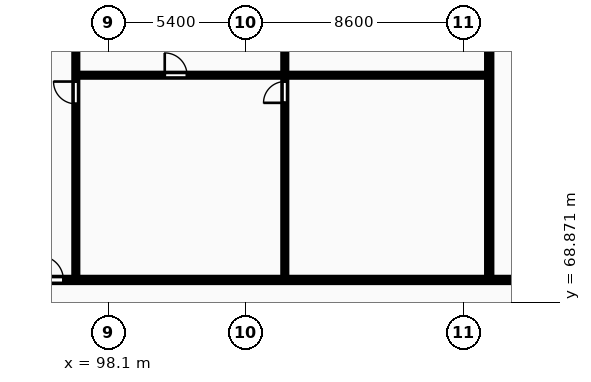
"""IFC4 building model, lengths in metres.
Left out: names, types, materials, properties, quantities, classifications, styles, units other than length and angle.
Written with IfcOpenShell. Run it as: python <this file> out.ifc"""

import sys

from ifc_helpers import new_model, si_unit, direction, frame, frame_2d, origin, place, context, subcontext, project, spatial, rectangle, extrude, element, fill, save


model = new_model("IFC4")
c1 = context("Model", 3, precision=1e-05, world=origin(), true_north=direction((0.0, 1.0)))
c2 = subcontext(c1, "Body", "Model", "MODEL_VIEW")
j1 = project(units=[si_unit("LENGTHUNIT", "METRE"), si_unit("PLANEANGLEUNIT", "RADIAN")], contexts=[c1])
p1 = place(None, origin())
s1 = spatial("IfcSite", under=j1, at=p1, CompositionType="ELEMENT")
p2 = place(p1, origin())
s2 = spatial("IfcBuilding", under=s1, at=p2, CompositionType="ELEMENT")
p3 = place(p2, frame((0.0, 0.0, 126.3)))
s3 = spatial("IfcBuildingStorey", under=s2, at=p3, CompositionType="ELEMENT", Elevation=126.3)
p4 = place(p3, frame((113.125, 69.83, 0.0), z_axis=(0.0, 0.0, 1.0), x_axis=(0.0, 1.0, 0.0)))
e1 = element("IfcWall", 1, at=p4, inside=s3, PredefinedType="PARTITIONING", context=c2, shape_type="SweptSolid", body=[
    extrude(rectangle(XDim=26.07, YDim=0.2, at=frame_2d((13.035, 0.0))), origin(), (0.0, 0.0, 1.0), 2.97),
])
p5 = place(p3, frame((105.056, 69.81, 0.0), z_axis=(0.0, 0.0, 1.0), x_axis=(0.0, 1.0, 0.0)))
e2 = element("IfcWall", 2, at=p5, inside=s3, PredefinedType="PARTITIONING", context=c2, shape_type="SweptSolid", body=[
    extrude(rectangle(XDim=16.4, YDim=0.15, at=frame_2d((8.2, 0.0))), origin(), (0.0, 0.0, 1.0), 2.97),
])
p6 = place(p5, frame((6.93, 0.0, 0.0)))
e3 = element("IfcOpeningElement", 3, at=p6, cuts=e2, PredefinedType="OPENING", context=c2, shape_type="SweptSolid", body=[
    extrude(rectangle(XDim=0.84, YDim=2.04, at=frame_2d((0.42, 1.02))), frame((0.0, 0.085, 0.0), z_axis=(0.0, -1.0, 0.0), x_axis=(1.0, 0.0, 0.0)), (0.0, 0.0, 1.0), 0.17),
])
p7 = place(p5, frame((11.582, 0.0, 0.0)))
e4 = element("IfcOpeningElement", 4, at=p7, cuts=e2, PredefinedType="OPENING", context=c2, shape_type="SweptSolid", body=[
    extrude(rectangle(XDim=0.88, YDim=2.06, at=frame_2d((0.44, 1.03))), frame((0.0, 0.085, 0.0), z_axis=(0.0, -1.0, 0.0), x_axis=(1.0, 0.0, 0.0)), (0.0, 0.0, 1.0), 0.17),
])
p8 = place(p3, frame((96.867, 77.83, 0.0), z_axis=(0.0, 0.0, 1.0), x_axis=(1.0, 0.0, 0.0)))
e5 = element("IfcWall", 5, at=p8, inside=s3, PredefinedType="PARTITIONING", context=c2, shape_type="SweptSolid", body=[
    extrude(rectangle(XDim=16.177, YDim=0.15, at=frame_2d((8.089, 0.0))), origin(), (0.0, 0.0, 1.0), 2.97),
])
p9 = place(p8, frame((3.45, 0.0, 0.0)))
e6 = element("IfcOpeningElement", 6, at=p9, cuts=e5, PredefinedType="OPENING", context=c2, shape_type="SweptSolid", body=[
    extrude(rectangle(XDim=0.88, YDim=2.06, at=frame_2d((0.44, 1.03))), frame((0.0, 0.085, 0.0), z_axis=(0.0, -1.0, 0.0), x_axis=(1.0, 0.0, 0.0)), (0.0, 0.0, 1.0), 0.17),
])
p10 = place(p3, frame((96.808, 69.81, 0.0), z_axis=(0.0, 0.0, 1.0), x_axis=(0.0, 1.0, 0.0)))
e7 = element("IfcWall", 7, at=p10, inside=s3, PredefinedType="PARTITIONING", context=c2, shape_type="SweptSolid", body=[
    extrude(rectangle(XDim=16.4, YDim=0.15, at=frame_2d((8.2, 0.0))), origin(), (0.0, 0.0, 1.0), 2.97),
])
p11 = place(p10, frame((6.89, 0.0, 0.0)))
e8 = element("IfcOpeningElement", 8, at=p11, cuts=e7, PredefinedType="OPENING", context=c2, shape_type="SweptSolid", body=[
    extrude(rectangle(XDim=0.88, YDim=2.06, at=frame_2d((0.44, 1.03))), frame((0.0, 0.085, 0.0), z_axis=(0.0, -1.0, 0.0), x_axis=(1.0, 0.0, 0.0)), (0.0, 0.0, 1.0), 0.17),
])
p12 = place(p3, frame((57.6, 69.75, 0.0), z_axis=(0.0, 0.0, 1.0), x_axis=(1.0, 0.0, 0.0)))
e9 = element("IfcWall", 9, at=p12, inside=s3, PredefinedType="PARTITIONING", context=c2, shape_type="SweptSolid", body=[
    extrude(rectangle(XDim=73.0, YDim=0.2, at=frame_2d((36.5, 0.0))), origin(), (0.0, 0.0, 1.0), 2.97),
])
p13 = place(p12, frame((6.629, 0.0, 0.0)))
e10 = element("IfcOpeningElement", 10, at=p13, cuts=e9, PredefinedType="OPENING", context=c2, shape_type="SweptSolid", body=[
    extrude(rectangle(XDim=1.22, YDim=2.18, at=frame_2d((0.61, 1.09))), frame((0.0, 0.11, 0.0), z_axis=(0.0, -1.0, 0.0), x_axis=(1.0, 0.0, 0.0)), (0.0, 0.0, 1.0), 0.22),
])
p14 = place(p12, frame((24.022, 0.0, 0.0)))
e11 = element("IfcOpeningElement", 11, at=p14, cuts=e9, PredefinedType="OPENING", context=c2, shape_type="SweptSolid", body=[
    extrude(rectangle(XDim=1.22, YDim=2.18, at=frame_2d((0.61, 1.09))), frame((0.0, 0.11, 0.0), z_axis=(0.0, -1.0, 0.0), x_axis=(1.0, 0.0, 0.0)), (0.0, 0.0, 1.0), 0.22),
])
p15 = place(p12, frame((37.768, 0.0, 0.0)))
e12 = element("IfcOpeningElement", 12, at=p15, cuts=e9, PredefinedType="OPENING", context=c2, shape_type="SweptSolid", body=[
    extrude(rectangle(XDim=0.95, YDim=2.15, at=frame_2d((0.475, 1.075))), frame((0.0, 0.11, 0.0), z_axis=(0.0, -1.0, 0.0), x_axis=(1.0, 0.0, 0.0)), (0.0, 0.0, 1.0), 0.22),
])
p16 = place(p12, frame((57.57, 0.0, 0.0)))
e13 = element("IfcOpeningElement", 13, at=p16, cuts=e9, PredefinedType="OPENING", context=c2, shape_type="SweptSolid", body=[
    extrude(rectangle(XDim=0.95, YDim=2.15, at=frame_2d((0.475, 1.075))), frame((0.0, 0.11, 0.0), z_axis=(0.0, -1.0, 0.0), x_axis=(1.0, 0.0, 0.0)), (0.0, 0.0, 1.0), 0.22),
])
p17 = place(p6, origin())
e14 = element("IfcDoor", 14, at=p17, inside=s3, OperationType="SINGLE_SWING_LEFT", PredefinedType="DOOR", context=c2, shape_type="SweptSolid", body=[
    extrude(rectangle(XDim=0.84, YDim=2.04, at=frame_2d((0.42, 1.02))), frame((0.0, 0.025, 0.0), z_axis=(0.0, -1.0, 0.0), x_axis=(1.0, 0.0, 0.0)), (0.0, 0.0, 1.0), 0.05),
])
fill(e3, e14)
p18 = place(p9, origin())
e15 = element("IfcDoor", 15, at=p18, inside=s3, OperationType="SINGLE_SWING_LEFT", PredefinedType="DOOR", context=c2, shape_type="SweptSolid", body=[
    extrude(rectangle(XDim=0.88, YDim=2.06, at=frame_2d((0.44, 1.03))), frame((0.0, 0.025, 0.0), z_axis=(0.0, -1.0, 0.0), x_axis=(1.0, 0.0, 0.0)), (0.0, 0.0, 1.0), 0.05),
])
fill(e6, e15)
p19 = place(p11, origin())
e16 = element("IfcDoor", 16, at=p19, inside=s3, OperationType="SINGLE_SWING_RIGHT", PredefinedType="DOOR", context=c2, shape_type="SweptSolid", body=[
    extrude(rectangle(XDim=0.88, YDim=2.06, at=frame_2d((0.44, 1.03))), frame((0.0, 0.025, 0.0), z_axis=(0.0, -1.0, 0.0), x_axis=(1.0, 0.0, 0.0)), (0.0, 0.0, 1.0), 0.05),
])
fill(e8, e16)
p20 = place(p15, origin())
e17 = element("IfcDoor", 17, at=p20, inside=s3, OperationType="SINGLE_SWING_LEFT", PredefinedType="DOOR", context=c2, shape_type="SweptSolid", body=[
    extrude(rectangle(XDim=0.95, YDim=2.15, at=frame_2d((0.475, 1.075))), frame((0.0, 0.025, 0.0), z_axis=(0.0, -1.0, 0.0), x_axis=(1.0, 0.0, 0.0)), (0.0, 0.0, 1.0), 0.05),
])
fill(e12, e17)
save(model, sys.argv[1])
